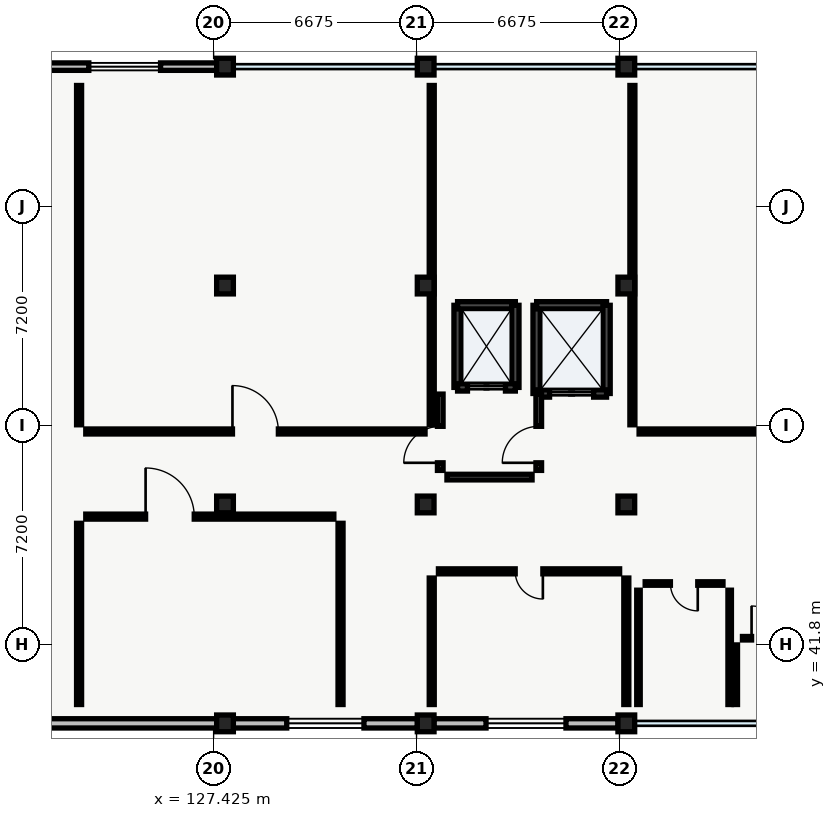
"""IFC4 building model, lengths in metres.
Left out: names, types, materials, properties, quantities, classifications, styles, units other than length and angle.
Written with IfcOpenShell. Run it as: python <this file> out.ifc"""

import sys

from ifc_helpers import new_model, si_unit, direction, frame, frame_2d, origin, origin_2d, place, context, subcontext, project, spatial, rectangle, extrude, element, fill, save


model = new_model("IFC4")
c1 = context("Model", 3, precision=1e-05, world=origin(), true_north=direction((0.0, 1.0)))
c2 = subcontext(c1, "Body", "Model", "MODEL_VIEW")
j1 = project(units=[si_unit("LENGTHUNIT", "METRE"), si_unit("PLANEANGLEUNIT", "RADIAN")], contexts=[c1])
p1 = place(None, origin())
s1 = spatial("IfcSite", under=j1, at=p1, CompositionType="ELEMENT")
p2 = place(p1, origin())
s2 = spatial("IfcBuilding", under=s1, at=p2, CompositionType="ELEMENT")
p3 = place(p2, frame((0.0, 0.0, 23.1)))
s3 = spatial("IfcBuildingStorey", under=s2, at=p3, CompositionType="ELEMENT", Elevation=23.1)
for number, where, z_axis, x_axis in (
    (1, (127.8, 39.2, 0.0), (0.0, 0.0, 1.0), (1.0, 0.0, 0.0)),
    (2, (127.8, 46.4, 0.0), (0.0, 0.0, 1.0), (1.0, 0.0, 0.0)),
    (3, (127.8, 53.6, 0.0), (0.0, 0.0, 1.0), (1.0, 0.0, 0.0)),
    (4, (127.8, 60.8, 0.0), (0.0, 0.0, 1.0), (1.0, 0.0, 0.0)),
    (5, (134.4, 39.2, 0.0), (0.0, 0.0, 1.0), (1.0, 0.0, 0.0)),
    (6, (134.4, 46.4, 0.0), (0.0, 0.0, 1.0), (1.0, 0.0, 0.0)),
    (7, (134.4, 53.6, 0.0), (0.0, 0.0, 1.0), (1.0, 0.0, 0.0)),
    (8, (134.4, 60.8, 0.0), (0.0, 0.0, 1.0), (1.0, 0.0, 0.0)),
    (9, (141.0, 39.2, 0.0), (0.0, 0.0, 1.0), (1.0, 0.0, 0.0)),
    (10, (141.0, 46.4, 0.0), (0.0, 0.0, 1.0), (1.0, 0.0, 0.0)),
    (11, (141.0, 53.6, 0.0), (0.0, 0.0, 1.0), (1.0, 0.0, 0.0)),
    (12, (141.0, 60.8, 0.0), (0.0, 0.0, 1.0), (1.0, 0.0, 0.0)),
):
    element("IfcColumn", number, at=place(p3, frame(where, z_axis=z_axis, x_axis=x_axis)), inside=s3, PredefinedType="COLUMN", context=c2, shape_type="SweptSolid", body=[
        extrude(rectangle(XDim=0.55, YDim=0.55, at=origin_2d()), origin(), (0.0, 0.0, 1.0), 4.29),
    ])
p4 = place(p3, frame((121.47, 60.8, 0.0), z_axis=(0.0, 0.0, 1.0), x_axis=(1.0, 0.0, 0.0)))
e13 = element("IfcWall", 13, at=p4, inside=s3, PredefinedType="STANDARD", context=c2, shape_type="SweptSolid", body=[
    extrude(rectangle(XDim=6.06, YDim=0.245, at=frame_2d((3.03, 0.0))), origin(), (0.0, 0.0, 1.0), 3.775),
])
p5 = place(p4, frame((1.85, 0.0, 0.95)))
e14 = element("IfcOpeningElement", 14, at=p5, cuts=e13, PredefinedType="OPENING", context=c2, shape_type="SweptSolid", body=[
    extrude(rectangle(XDim=2.36, YDim=1.36, at=frame_2d((1.18, 0.68))), frame((0.0, 0.123, 0.0), z_axis=(0.0, -1.0, 0.0), x_axis=(1.0, 0.0, 0.0)), (0.0, 0.0, 1.0), 0.245),
])
p6 = place(p3, frame((140.73, 39.2, 0.0), z_axis=(0.0, 0.0, 1.0), x_axis=(-1.0, 0.0, 0.0)))
e15 = element("IfcWall", 15, at=p6, inside=s3, PredefinedType="STANDARD", context=c2, shape_type="SweptSolid", body=[
    extrude(rectangle(XDim=6.06, YDim=0.305, at=frame_2d((3.03, 0.0))), origin(), (0.0, 0.0, 1.0), 3.775),
])
p7 = place(p6, frame((1.715, 0.0, 0.95)))
e16 = element("IfcOpeningElement", 16, at=p7, cuts=e15, PredefinedType="OPENING", context=c2, shape_type="SweptSolid", body=[
    extrude(rectangle(XDim=2.63, YDim=1.42, at=frame_2d((1.315, 0.71))), frame((0.0, 0.152, 0.0), z_axis=(0.0, -1.0, 0.0), x_axis=(1.0, 0.0, 0.0)), (0.0, 0.0, 1.0), 0.305),
])
p8 = place(p3, frame((134.13, 39.2, 0.0), z_axis=(0.0, 0.0, 1.0), x_axis=(-1.0, 0.0, 0.0)))
e17 = element("IfcWall", 17, at=p8, inside=s3, PredefinedType="STANDARD", context=c2, shape_type="SweptSolid", body=[
    extrude(rectangle(XDim=6.06, YDim=0.305, at=frame_2d((3.03, 0.0))), origin(), (0.0, 0.0, 1.0), 3.775),
])
p9 = place(p8, frame((1.76, 0.0, 0.95)))
e18 = element("IfcOpeningElement", 18, at=p9, cuts=e17, PredefinedType="OPENING", context=c2, shape_type="SweptSolid", body=[
    extrude(rectangle(XDim=2.54, YDim=1.4, at=frame_2d((1.27, 0.7))), frame((0.0, 0.152, 0.0), z_axis=(0.0, -1.0, 0.0), x_axis=(1.0, 0.0, 0.0)), (0.0, 0.0, 1.0), 0.305),
])
p10 = place(p3, frame((127.53, 39.2, 0.0), z_axis=(0.0, 0.0, 1.0), x_axis=(-1.0, 0.0, 0.0)))
e19 = element("IfcWall", 19, at=p10, inside=s3, PredefinedType="STANDARD", context=c2, shape_type="SweptSolid", body=[
    extrude(rectangle(XDim=6.06, YDim=0.305, at=frame_2d((3.03, 0.0))), origin(), (0.0, 0.0, 1.0), 3.775),
])
p11 = place(p3, frame((135.45, 50.25, 0.0), z_axis=(0.0, 0.0, 1.0), x_axis=(0.0, 1.0, 0.0)))
e20 = element("IfcWall", 20, at=p11, inside=s3, PredefinedType="SHEAR", context=c2, shape_type="SweptSolid", body=[
    extrude(rectangle(XDim=2.7, YDim=0.24, at=frame_2d((1.35, 0.0))), origin(), (0.0, 0.0, 1.0), 4.28),
])
p12 = place(p3, frame((135.45, 52.95, 0.0), z_axis=(0.0, 0.0, 1.0), x_axis=(1.0, 0.0, 0.0)))
e21 = element("IfcWall", 21, at=p12, inside=s3, PredefinedType="SHEAR", context=c2, shape_type="SweptSolid", body=[
    extrude(rectangle(XDim=1.9, YDim=0.24, at=frame_2d((0.95, 0.0))), origin(), (0.0, 0.0, 1.0), 4.28),
])
p13 = place(p3, frame((137.35, 52.95, 0.0), z_axis=(0.0, 0.0, 1.0), x_axis=(0.0, -1.0, 0.0)))
e22 = element("IfcWall", 22, at=p13, inside=s3, PredefinedType="SHEAR", context=c2, shape_type="SweptSolid", body=[
    extrude(rectangle(XDim=2.7, YDim=0.24, at=frame_2d((1.35, 0.0))), origin(), (0.0, 0.0, 1.0), 4.28),
])
p14 = place(p3, frame((137.35, 50.25, 0.0), z_axis=(0.0, 0.0, 1.0), x_axis=(-1.0, 0.0, 0.0)))
e23 = element("IfcWall", 23, at=p14, inside=s3, PredefinedType="SHEAR", context=c2, shape_type="SweptSolid", body=[
    extrude(rectangle(XDim=1.9, YDim=0.24, at=frame_2d((0.95, 0.0))), origin(), (0.0, 0.0, 1.0), 4.28),
])
p15 = place(p14, frame((0.325, 0.0, 0.0)))
e24 = element("IfcOpeningElement", 24, at=p15, cuts=e23, PredefinedType="OPENING", context=c2, shape_type="SweptSolid", body=[
    extrude(rectangle(XDim=1.25, YDim=2.2, at=frame_2d((0.625, 1.1))), frame((0.0, 0.12, 0.0), z_axis=(0.0, -1.0, 0.0), x_axis=(1.0, 0.0, 0.0)), (0.0, 0.0, 1.0), 0.24),
])
p16 = place(p3, frame((138.05, 50.05, 0.0), z_axis=(0.0, 0.0, 1.0), x_axis=(0.0, 1.0, 0.0)))
e25 = element("IfcWall", 25, at=p16, inside=s3, PredefinedType="SHEAR", context=c2, shape_type="SweptSolid", body=[
    extrude(rectangle(XDim=2.9, YDim=0.24, at=frame_2d((1.45, 0.0))), origin(), (0.0, 0.0, 1.0), 4.28),
])
p17 = place(p3, frame((138.05, 52.95, 0.0), z_axis=(0.0, 0.0, 1.0), x_axis=(1.0, 0.0, 0.0)))
e26 = element("IfcWall", 26, at=p17, inside=s3, PredefinedType="SHEAR", context=c2, shape_type="SweptSolid", body=[
    extrude(rectangle(XDim=2.3, YDim=0.24, at=frame_2d((1.15, 0.0))), origin(), (0.0, 0.0, 1.0), 4.28),
])
p18 = place(p3, frame((140.35, 52.95, 0.0), z_axis=(0.0, 0.0, 1.0), x_axis=(0.0, -1.0, 0.0)))
e27 = element("IfcWall", 27, at=p18, inside=s3, PredefinedType="SHEAR", context=c2, shape_type="SweptSolid", body=[
    extrude(rectangle(XDim=2.9, YDim=0.24, at=frame_2d((1.45, 0.0))), origin(), (0.0, 0.0, 1.0), 4.28),
])
p19 = place(p3, frame((140.35, 50.05, 0.0), z_axis=(0.0, 0.0, 1.0), x_axis=(-1.0, 0.0, 0.0)))
e28 = element("IfcWall", 28, at=p19, inside=s3, PredefinedType="SHEAR", context=c2, shape_type="SweptSolid", body=[
    extrude(rectangle(XDim=2.3, YDim=0.24, at=frame_2d((1.15, 0.0))), origin(), (0.0, 0.0, 1.0), 4.28),
])
p20 = place(p19, frame((0.425, 0.0, 0.0)))
e29 = element("IfcOpeningElement", 29, at=p20, cuts=e28, PredefinedType="OPENING", context=c2, shape_type="SweptSolid", body=[
    extrude(rectangle(XDim=1.45, YDim=2.3, at=frame_2d((0.725, 1.15))), frame((0.0, 0.12, 0.0), z_axis=(0.0, -1.0, 0.0), x_axis=(1.0, 0.0, 0.0)), (0.0, 0.0, 1.0), 0.24),
])
p21 = place(p3, frame((135.1, 47.3, 0.0), z_axis=(0.0, 0.0, 1.0), x_axis=(1.0, 0.0, 0.0)))
e30 = element("IfcWall", 30, at=p21, inside=s3, PredefinedType="SOLIDWALL", context=c2, shape_type="SweptSolid", body=[
    extrude(rectangle(XDim=2.8, YDim=0.185, at=frame_2d((1.4, 0.0))), origin(), (0.0, 0.0, 1.0), 3.95),
])
p22 = place(p3, frame((138.12, 47.52, 0.0), z_axis=(0.0, 0.0, 1.0), x_axis=(0.0, 1.0, 0.0)))
e31 = element("IfcWall", 31, at=p22, inside=s3, PredefinedType="SOLIDWALL", context=c2, shape_type="SweptSolid", body=[
    extrude(rectangle(XDim=2.51, YDim=0.185, at=frame_2d((1.255, 0.0))), origin(), (0.0, 0.0, 1.0), 3.95),
])
p23 = place(p22, frame((0.25, 0.0, 0.0)))
e32 = element("IfcOpeningElement", 32, at=p23, cuts=e31, PredefinedType="OPENING", context=c2, shape_type="SweptSolid", body=[
    extrude(rectangle(XDim=1.2, YDim=2.15, at=frame_2d((0.6, 1.075))), frame((0.0, 0.093, 0.0), z_axis=(0.0, -1.0, 0.0), x_axis=(1.0, 0.0, 0.0)), (0.0, 0.0, 1.0), 0.185),
])
p24 = place(p3, frame((134.88, 50.03, 0.0), z_axis=(0.0, 0.0, 1.0), x_axis=(0.0, -1.0, 0.0)))
e33 = element("IfcWall", 33, at=p24, inside=s3, PredefinedType="SOLIDWALL", context=c2, shape_type="SweptSolid", body=[
    extrude(rectangle(XDim=2.51, YDim=0.185, at=frame_2d((1.255, 0.0))), origin(), (0.0, 0.0, 1.0), 3.95),
])
p25 = place(p24, frame((1.06, 0.0, 0.0)))
e34 = element("IfcOpeningElement", 34, at=p25, cuts=e33, PredefinedType="OPENING", context=c2, shape_type="SweptSolid", body=[
    extrude(rectangle(XDim=1.2, YDim=2.15, at=frame_2d((0.6, 1.075))), frame((0.0, 0.093, 0.0), z_axis=(0.0, -1.0, 0.0), x_axis=(1.0, 0.0, 0.0)), (0.0, 0.0, 1.0), 0.185),
])
p26 = place(p3, frame((144.4, 39.82, 0.0), z_axis=(0.0, 0.0, 1.0), x_axis=(0.0, 1.0, 0.0)))
e35 = element("IfcWall", 35, at=p26, inside=s3, PredefinedType="PARTITIONING", context=c2, shape_type="SweptSolid", body=[
    extrude(rectangle(XDim=3.76, YDim=0.115, at=frame_2d((1.88, 0.0))), origin(), (0.0, 0.0, 1.0), 3.95),
])
p27 = place(p3, frame((144.18, 43.8, 0.0), z_axis=(0.0, 0.0, 1.0), x_axis=(-1.0, 0.0, 0.0)))
e36 = element("IfcWall", 36, at=p27, inside=s3, PredefinedType="PARTITIONING", context=c2, shape_type="SweptSolid", body=[
    extrude(rectangle(XDim=2.56, YDim=0.115, at=frame_2d((1.28, 0.0))), origin(), (0.0, 0.0, 1.0), 3.95),
])
p28 = place(p27, frame((0.83, 0.0, 0.0)))
e37 = element("IfcOpeningElement", 37, at=p28, cuts=e36, PredefinedType="OPENING", context=c2, shape_type="SweptSolid", body=[
    extrude(rectangle(XDim=0.9, YDim=2.1, at=frame_2d((0.45, 1.05))), frame((0.0, 0.058, 0.0), z_axis=(0.0, -1.0, 0.0), x_axis=(1.0, 0.0, 0.0)), (0.0, 0.0, 1.0), 0.115),
])
p29 = place(p3, frame((141.4, 43.58, 0.0), z_axis=(0.0, 0.0, 1.0), x_axis=(0.0, -1.0, 0.0)))
e38 = element("IfcWall", 38, at=p29, inside=s3, PredefinedType="PARTITIONING", context=c2, shape_type="SweptSolid", body=[
    extrude(rectangle(XDim=3.76, YDim=0.115, at=frame_2d((1.88, 0.0))), origin(), (0.0, 0.0, 1.0), 3.95),
])
p30 = place(p3, frame((146.48, 42.0, 0.0), z_axis=(0.0, 0.0, 1.0), x_axis=(-1.0, 0.0, 0.0)))
e39 = element("IfcWall", 39, at=p30, inside=s3, PredefinedType="PARTITIONING", context=c2, shape_type="SweptSolid", body=[
    extrude(rectangle(XDim=1.66, YDim=0.115, at=frame_2d((0.83, 0.0))), origin(), (0.0, 0.0, 1.0), 3.95),
])
p31 = place(p30, frame((0.3, 0.0, 0.0)))
e40 = element("IfcOpeningElement", 40, at=p31, cuts=e39, PredefinedType="OPENING", context=c2, shape_type="SweptSolid", body=[
    extrude(rectangle(XDim=1.06, YDim=2.12, at=frame_2d((0.53, 1.06))), frame((0.0, 0.058, 0.0), z_axis=(0.0, -1.0, 0.0), x_axis=(1.0, 0.0, 0.0)), (0.0, 0.0, 1.0), 0.115),
])
p32 = place(p3, frame((144.6, 41.78, 0.0), z_axis=(0.0, 0.0, 1.0), x_axis=(0.0, -1.0, 0.0)))
e41 = element("IfcWall", 41, at=p32, inside=s3, PredefinedType="PARTITIONING", context=c2, shape_type="SweptSolid", body=[
    extrude(rectangle(XDim=1.96, YDim=0.115, at=frame_2d((0.98, 0.0))), origin(), (0.0, 0.0, 1.0), 3.95),
])
p33 = place(p3, frame((123.22, 48.8, 0.0), z_axis=(0.0, 0.0, 1.0), x_axis=(1.0, 0.0, 0.0)))
e42 = element("IfcWall", 42, at=p33, inside=s3, PredefinedType="PARTITIONING", context=c2, shape_type="SweptSolid", body=[
    extrude(rectangle(XDim=11.16, YDim=0.165, at=frame_2d((5.58, 0.0))), origin(), (0.0, 0.0, 1.0), 3.825),
])
p34 = place(p33, frame((4.825, 0.0, 0.0)))
e43 = element("IfcOpeningElement", 43, at=p34, cuts=e42, PredefinedType="OPENING", context=c2, shape_type="SweptSolid", body=[
    extrude(rectangle(XDim=1.51, YDim=2.12, at=frame_2d((0.755, 1.06))), frame((0.0, 0.083, 0.0), z_axis=(0.0, -1.0, 0.0), x_axis=(1.0, 0.0, 0.0)), (0.0, 0.0, 1.0), 0.165),
])
p35 = place(p3, frame((134.6, 49.02, 0.0), z_axis=(0.0, 0.0, 1.0), x_axis=(0.0, 1.0, 0.0)))
e44 = element("IfcWall", 44, at=p35, inside=s3, PredefinedType="PARTITIONING", context=c2, shape_type="SweptSolid", body=[
    extrude(rectangle(XDim=11.16, YDim=0.165, at=frame_2d((5.58, 0.0))), origin(), (0.0, 0.0, 1.0), 3.675),
])
p36 = place(p3, frame((123.0, 60.18, 0.0), z_axis=(0.0, 0.0, 1.0), x_axis=(0.0, -1.0, 0.0)))
e45 = element("IfcWall", 45, at=p36, inside=s3, PredefinedType="PARTITIONING", context=c2, shape_type="SweptSolid", body=[
    extrude(rectangle(XDim=11.16, YDim=0.165, at=frame_2d((5.58, 0.0))), origin(), (0.0, 0.0, 1.0), 3.95),
])
p37 = place(p3, frame((141.42, 48.8, 0.0), z_axis=(0.0, 0.0, 1.0), x_axis=(1.0, 0.0, 0.0)))
e46 = element("IfcWall", 46, at=p37, inside=s3, PredefinedType="PARTITIONING", context=c2, shape_type="SweptSolid", body=[
    extrude(rectangle(XDim=10.56, YDim=0.165, at=frame_2d((5.28, 0.0))), origin(), (0.0, 0.0, 1.0), 3.825),
])
p38 = place(p37, frame((4.51, 0.0, 0.0)))
e47 = element("IfcOpeningElement", 47, at=p38, cuts=e46, PredefinedType="OPENING", context=c2, shape_type="SweptSolid", body=[
    extrude(rectangle(XDim=1.54, YDim=2.14, at=frame_2d((0.77, 1.07))), frame((0.0, 0.083, 0.0), z_axis=(0.0, -1.0, 0.0), x_axis=(1.0, 0.0, 0.0)), (0.0, 0.0, 1.0), 0.165),
])
p39 = place(p3, frame((141.2, 60.18, 0.0), z_axis=(0.0, 0.0, 1.0), x_axis=(0.0, -1.0, 0.0)))
e48 = element("IfcWall", 48, at=p39, inside=s3, PredefinedType="PARTITIONING", context=c2, shape_type="SweptSolid", body=[
    extrude(rectangle(XDim=11.16, YDim=0.165, at=frame_2d((5.58, 0.0))), origin(), (0.0, 0.0, 1.0), 3.675),
])
p40 = place(p3, frame((131.6, 39.82, 0.0), z_axis=(0.0, 0.0, 1.0), x_axis=(0.0, 1.0, 0.0)))
e49 = element("IfcWall", 49, at=p40, inside=s3, PredefinedType="PARTITIONING", context=c2, shape_type="SweptSolid", body=[
    extrude(rectangle(XDim=5.96, YDim=0.165, at=frame_2d((2.98, 0.0))), origin(), (0.0, 0.0, 1.0), 3.95),
])
p41 = place(p3, frame((131.38, 46.0, 0.0), z_axis=(0.0, 0.0, 1.0), x_axis=(-1.0, 0.0, 0.0)))
e50 = element("IfcWall", 50, at=p41, inside=s3, PredefinedType="PARTITIONING", context=c2, shape_type="SweptSolid", body=[
    extrude(rectangle(XDim=8.16, YDim=0.165, at=frame_2d((4.08, 0.0))), origin(), (0.0, 0.0, 1.0), 3.95),
])
p42 = place(p41, frame((4.592, 0.0, 0.0)))
e51 = element("IfcOpeningElement", 51, at=p42, cuts=e50, PredefinedType="OPENING", context=c2, shape_type="SweptSolid", body=[
    extrude(rectangle(XDim=1.6, YDim=2.06, at=frame_2d((0.8, 1.03))), frame((0.0, 0.083, 0.0), z_axis=(0.0, -1.0, 0.0), x_axis=(1.0, 0.0, 0.0)), (0.0, 0.0, 1.0), 0.165),
])
p43 = place(p3, frame((123.0, 45.78, 0.0), z_axis=(0.0, 0.0, 1.0), x_axis=(0.0, -1.0, 0.0)))
e52 = element("IfcWall", 52, at=p43, inside=s3, PredefinedType="PARTITIONING", context=c2, shape_type="SweptSolid", body=[
    extrude(rectangle(XDim=5.96, YDim=0.165, at=frame_2d((2.98, 0.0))), origin(), (0.0, 0.0, 1.0), 3.95),
])
p44 = place(p3, frame((141.0, 39.82, 0.0), z_axis=(0.0, 0.0, 1.0), x_axis=(0.0, 1.0, 0.0)))
e53 = element("IfcWall", 53, at=p44, inside=s3, PredefinedType="PARTITIONING", context=c2, shape_type="SweptSolid", body=[
    extrude(rectangle(XDim=4.16, YDim=0.165, at=frame_2d((2.08, 0.0))), origin(), (0.0, 0.0, 1.0), 3.675),
])
p45 = place(p3, frame((140.78, 44.2, 0.0), z_axis=(0.0, 0.0, 1.0), x_axis=(-1.0, 0.0, 0.0)))
e54 = element("IfcWall", 54, at=p45, inside=s3, PredefinedType="PARTITIONING", context=c2, shape_type="SweptSolid", body=[
    extrude(rectangle(XDim=5.96, YDim=0.165, at=frame_2d((2.98, 0.0))), origin(), (0.0, 0.0, 1.0), 3.825),
])
p46 = place(p45, frame((2.525, 0.0, 0.0)))
e55 = element("IfcOpeningElement", 55, at=p46, cuts=e54, PredefinedType="OPENING", context=c2, shape_type="SweptSolid", body=[
    extrude(rectangle(XDim=0.91, YDim=2.08, at=frame_2d((0.455, 1.04))), frame((0.0, 0.083, 0.0), z_axis=(0.0, -1.0, 0.0), x_axis=(1.0, 0.0, 0.0)), (0.0, 0.0, 1.0), 0.165),
])
p47 = place(p3, frame((134.6, 43.98, 0.0), z_axis=(0.0, 0.0, 1.0), x_axis=(0.0, -1.0, 0.0)))
e56 = element("IfcWall", 56, at=p47, inside=s3, PredefinedType="PARTITIONING", context=c2, shape_type="SweptSolid", body=[
    extrude(rectangle(XDim=4.16, YDim=0.165, at=frame_2d((2.08, 0.0))), origin(), (0.0, 0.0, 1.0), 3.675),
])
p48 = place(p5, origin())
e57 = element("IfcWindow", 57, at=p48, inside=s3, PartitioningType="SINGLE_PANEL", PredefinedType="WINDOW", context=c2, shape_type="SweptSolid", body=[
    extrude(rectangle(XDim=2.36, YDim=1.36, at=frame_2d((1.18, 0.68))), frame((0.0, 0.03, 0.0), z_axis=(0.0, -1.0, 0.0), x_axis=(1.0, 0.0, 0.0)), (0.0, 0.0, 1.0), 0.06),
])
fill(e14, e57)
p49 = place(p7, origin())
e58 = element("IfcWindow", 58, at=p49, inside=s3, PartitioningType="SINGLE_PANEL", PredefinedType="WINDOW", context=c2, shape_type="SweptSolid", body=[
    extrude(rectangle(XDim=2.63, YDim=1.42, at=frame_2d((1.315, 0.71))), frame((0.0, 0.03, 0.0), z_axis=(0.0, -1.0, 0.0), x_axis=(1.0, 0.0, 0.0)), (0.0, 0.0, 1.0), 0.06),
])
fill(e16, e58)
p50 = place(p9, origin())
e59 = element("IfcWindow", 59, at=p50, inside=s3, PartitioningType="SINGLE_PANEL", PredefinedType="WINDOW", context=c2, shape_type="SweptSolid", body=[
    extrude(rectangle(XDim=2.54, YDim=1.4, at=frame_2d((1.27, 0.7))), frame((0.0, 0.03, 0.0), z_axis=(0.0, -1.0, 0.0), x_axis=(1.0, 0.0, 0.0)), (0.0, 0.0, 1.0), 0.06),
])
fill(e18, e59)
p51 = place(p15, origin())
e60 = element("IfcDoor", 60, at=p51, inside=s3, OperationType="SLIDING_TO_RIGHT", PredefinedType="DOOR", context=c2, shape_type="SweptSolid", body=[
    extrude(rectangle(XDim=1.25, YDim=2.2, at=frame_2d((0.625, 1.1))), frame((0.0, 0.025, 0.0), z_axis=(0.0, -1.0, 0.0), x_axis=(1.0, 0.0, 0.0)), (0.0, 0.0, 1.0), 0.05),
])
fill(e24, e60)
p52 = place(p20, origin())
e61 = element("IfcDoor", 61, at=p52, inside=s3, OperationType="DOUBLE_DOOR_SLIDING", PredefinedType="DOOR", context=c2, shape_type="SweptSolid", body=[
    extrude(rectangle(XDim=1.45, YDim=2.3, at=frame_2d((0.725, 1.15))), frame((0.0, 0.025, 0.0), z_axis=(0.0, -1.0, 0.0), x_axis=(1.0, 0.0, 0.0)), (0.0, 0.0, 1.0), 0.05),
])
fill(e29, e61)
p53 = place(p23, origin())
e62 = element("IfcDoor", 62, at=p53, inside=s3, OperationType="SINGLE_SWING_LEFT", PredefinedType="DOOR", context=c2, shape_type="SweptSolid", body=[
    extrude(rectangle(XDim=1.2, YDim=2.15, at=frame_2d((0.6, 1.075))), frame((0.0, 0.025, 0.0), z_axis=(0.0, -1.0, 0.0), x_axis=(1.0, 0.0, 0.0)), (0.0, 0.0, 1.0), 0.05),
])
fill(e32, e62)
p54 = place(p25, origin())
e63 = element("IfcDoor", 63, at=p54, inside=s3, OperationType="SINGLE_SWING_RIGHT", PredefinedType="DOOR", context=c2, shape_type="SweptSolid", body=[
    extrude(rectangle(XDim=1.2, YDim=2.15, at=frame_2d((0.6, 1.075))), frame((0.0, 0.025, 0.0), z_axis=(0.0, -1.0, 0.0), x_axis=(1.0, 0.0, 0.0)), (0.0, 0.0, 1.0), 0.05),
])
fill(e34, e63)
p55 = place(p28, origin())
e64 = element("IfcDoor", 64, at=p55, inside=s3, OperationType="SINGLE_SWING_LEFT", PredefinedType="DOOR", context=c2, shape_type="SweptSolid", body=[
    extrude(rectangle(XDim=0.9, YDim=2.1, at=frame_2d((0.45, 1.05))), frame((0.0, 0.025, 0.0), z_axis=(0.0, -1.0, 0.0), x_axis=(1.0, 0.0, 0.0)), (0.0, 0.0, 1.0), 0.05),
])
fill(e37, e64)
p56 = place(p31, origin())
e65 = element("IfcDoor", 65, at=p56, inside=s3, OperationType="SINGLE_SWING_RIGHT", PredefinedType="DOOR", context=c2, shape_type="SweptSolid", body=[
    extrude(rectangle(XDim=1.06, YDim=2.12, at=frame_2d((0.53, 1.06))), frame((0.0, 0.025, 0.0), z_axis=(0.0, -1.0, 0.0), x_axis=(1.0, 0.0, 0.0)), (0.0, 0.0, 1.0), 0.05),
])
fill(e40, e65)
p57 = place(p34, origin())
e66 = element("IfcDoor", 66, at=p57, inside=s3, OperationType="SINGLE_SWING_LEFT", PredefinedType="DOOR", context=c2, shape_type="SweptSolid", body=[
    extrude(rectangle(XDim=1.51, YDim=2.12, at=frame_2d((0.755, 1.06))), frame((0.0, 0.025, 0.0), z_axis=(0.0, -1.0, 0.0), x_axis=(1.0, 0.0, 0.0)), (0.0, 0.0, 1.0), 0.05),
])
fill(e43, e66)
p58 = place(p42, origin())
e67 = element("IfcDoor", 67, at=p58, inside=s3, OperationType="SINGLE_SWING_RIGHT", PredefinedType="DOOR", context=c2, shape_type="SweptSolid", body=[
    extrude(rectangle(XDim=1.6, YDim=2.06, at=frame_2d((0.8, 1.03))), frame((0.0, 0.025, 0.0), z_axis=(0.0, -1.0, 0.0), x_axis=(1.0, 0.0, 0.0)), (0.0, 0.0, 1.0), 0.05),
])
fill(e51, e67)
p59 = place(p46, origin())
e68 = element("IfcDoor", 68, at=p59, inside=s3, OperationType="SINGLE_SWING_LEFT", PredefinedType="DOOR", context=c2, shape_type="SweptSolid", body=[
    extrude(rectangle(XDim=0.91, YDim=2.08, at=frame_2d((0.455, 1.04))), frame((0.0, 0.025, 0.0), z_axis=(0.0, -1.0, 0.0), x_axis=(1.0, 0.0, 0.0)), (0.0, 0.0, 1.0), 0.05),
])
fill(e55, e68)
save(model, sys.argv[1])
